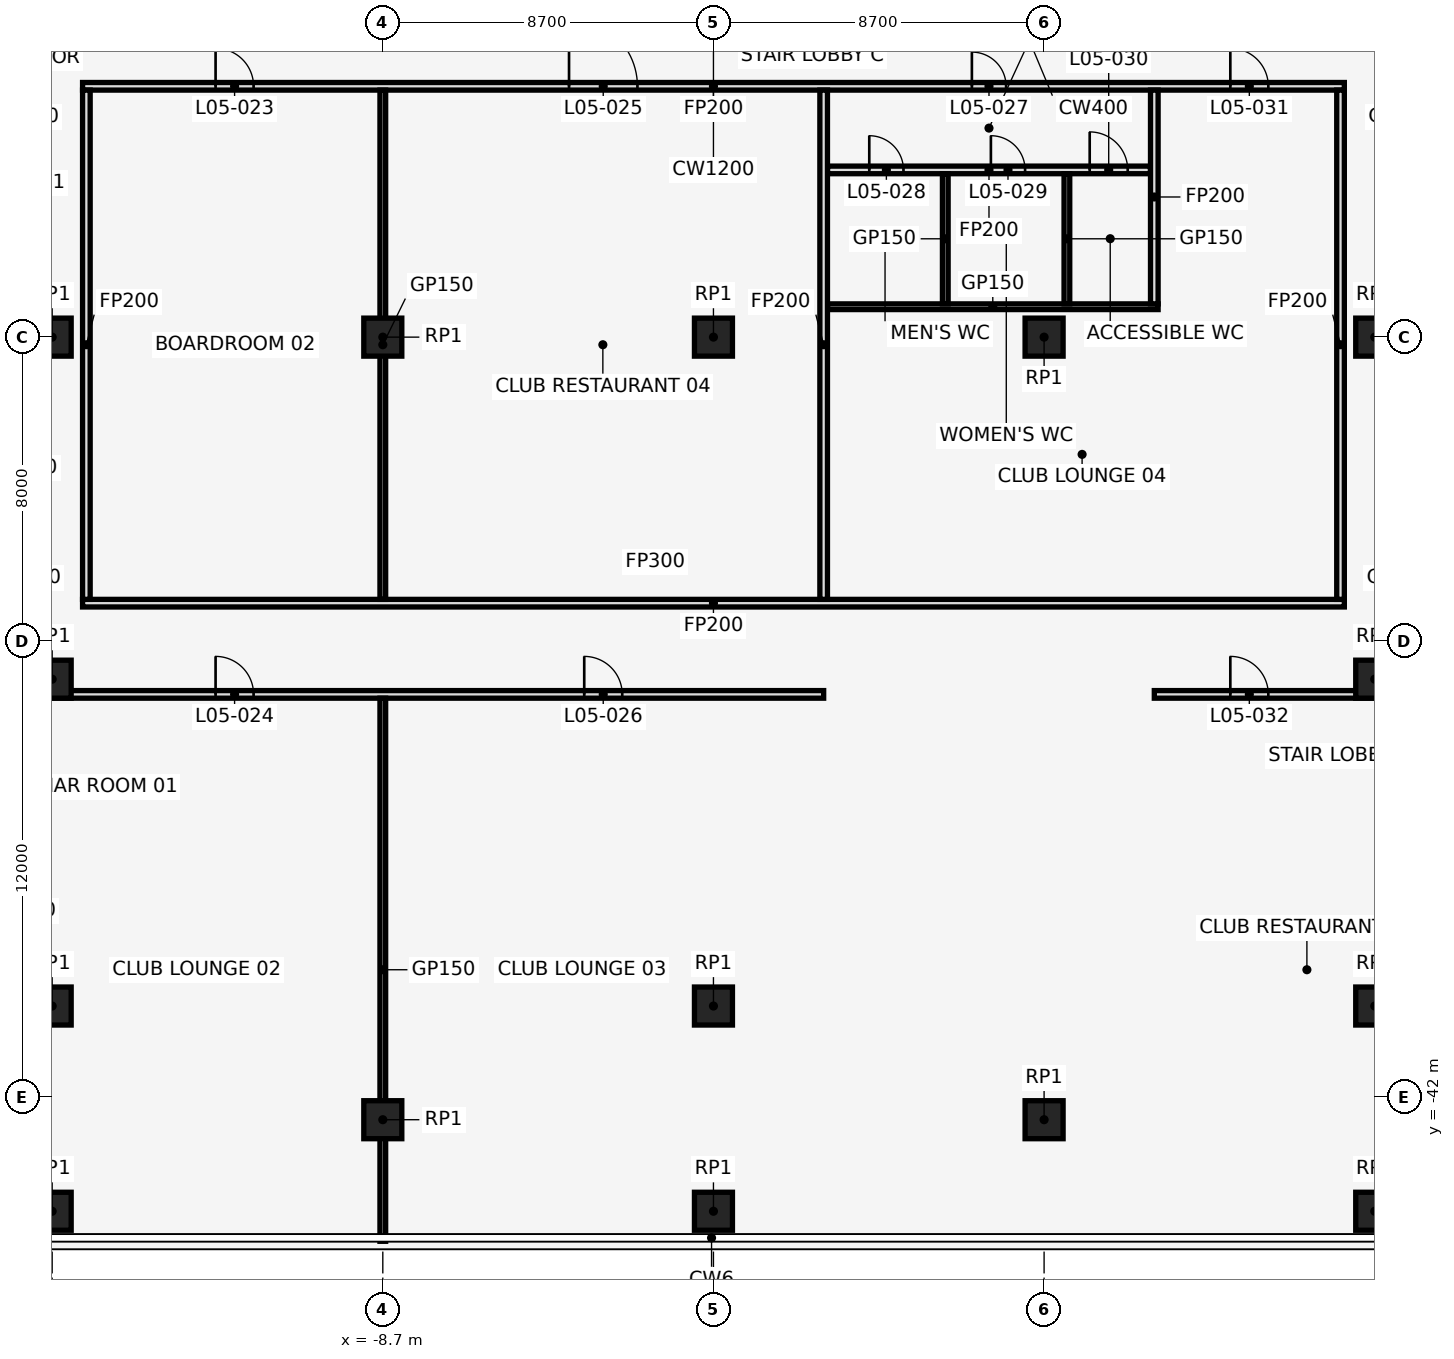
"""IFC4 building model, lengths in metres.
Left out: names, types, materials, properties, quantities, classifications, styles, units other than length and angle.
Written with IfcOpenShell. Run it as: python <this file> out.ifc"""

import sys

from ifc_helpers import new_model, si_unit, direction, frame, frame_2d, origin, origin_2d, place, context, subcontext, project, spatial, rectangle, extrude, element, fill, save


model = new_model("IFC4")
c1 = context("Model", 3, precision=1e-05, world=origin(), true_north=direction((0.0, 1.0)))
c2 = subcontext(c1, "Body", "Model", "MODEL_VIEW")
j1 = project(units=[si_unit("LENGTHUNIT", "METRE"), si_unit("PLANEANGLEUNIT", "RADIAN")], contexts=[c1])
p1 = place(None, origin())
s1 = spatial("IfcSite", under=j1, at=p1, CompositionType="ELEMENT")
p2 = place(p1, origin())
s2 = spatial("IfcBuilding", under=s1, at=p2, CompositionType="ELEMENT")
p3 = place(p2, frame((0.0, 0.0, 30.0)))
s3 = spatial("IfcBuildingStorey", under=s2, at=p3, CompositionType="ELEMENT", Elevation=30.0)
for number, where, z_axis, x_axis in (
    (1, (-17.4, -39.6, 0.0), (0.0, 0.0, 1.0), (1.0, 0.0, 0.0)),
    (2, (-8.7, -42.591, 0.0), (0.0, 0.0, 1.0), (1.0, 0.0, 0.0)),
    (3, (0.0, -39.6, 0.0), (0.0, 0.0, 1.0), (1.0, 0.0, 0.0)),
    (4, (8.7, -42.591, 0.0), (0.0, 0.0, 1.0), (1.0, 0.0, 0.0)),
    (5, (17.4, -39.6, 0.0), (0.0, 0.0, 1.0), (1.0, 0.0, 0.0)),
    (6, (-17.4, -22.0, 0.0), (0.0, 0.0, 1.0), (1.0, 0.0, 0.0)),
    (7, (-8.7, -22.0, 0.0), (0.0, 0.0, 1.0), (1.0, 0.0, 0.0)),
    (8, (0.0, -22.0, 0.0), (0.0, 0.0, 1.0), (1.0, 0.0, 0.0)),
    (9, (8.7, -22.0, 0.0), (0.0, 0.0, 1.0), (1.0, 0.0, 0.0)),
    (10, (17.4, -22.0, 0.0), (0.0, 0.0, 1.0), (1.0, 0.0, 0.0)),
    (11, (-17.4, -31.0, 0.0), (0.0, 0.0, 1.0), (1.0, 0.0, 0.0)),
    (12, (-17.4, -45.0, 0.0), (0.0, 0.0, 1.0), (1.0, 0.0, 0.0)),
    (13, (0.0, -45.0, 0.0), (0.0, 0.0, 1.0), (1.0, 0.0, 0.0)),
    (14, (17.4, -31.0, 0.0), (0.0, 0.0, 1.0), (1.0, 0.0, 0.0)),
    (15, (17.4, -45.0, 0.0), (0.0, 0.0, 1.0), (1.0, 0.0, 0.0)),
):
    element("IfcColumn", number, at=place(p3, frame(where, z_axis=z_axis, x_axis=x_axis)), inside=s3, PredefinedType="COLUMN", context=c2, shape_type="SweptSolid", body=[
        extrude(rectangle(XDim=1.0, YDim=1.0, at=origin_2d()), origin(), (0.0, 0.0, 1.0), 5.0),
    ])
p4 = place(p3, frame((-42.0, -31.4, 0.0), z_axis=(0.0, 0.0, 1.0), x_axis=(1.0, 0.0, 0.0)))
e16 = element("IfcWall", 16, at=p4, inside=s3, PredefinedType="PARTITIONING", context=c2, shape_type="SweptSolid", body=[
    extrude(rectangle(XDim=44.9, YDim=0.2, at=frame_2d((22.45, 0.0))), origin(), (0.0, 0.0, 1.0), 3.74),
])
p5 = place(p4, frame((1.5, 0.0, 0.0)))
e17 = element("IfcOpeningElement", 17, at=p5, cuts=e16, PredefinedType="OPENING", context=c2, shape_type="SweptSolid", body=[
    extrude(rectangle(XDim=1.0, YDim=2.1, at=frame_2d((0.5, 1.05))), frame((0.0, 0.112, 0.0), z_axis=(0.0, -1.0, 0.0), x_axis=(1.0, 0.0, 0.0)), (0.0, 0.0, 1.0), 0.224),
])
p6 = place(p4, frame((8.5, 0.0, 0.0)))
e18 = element("IfcOpeningElement", 18, at=p6, cuts=e16, PredefinedType="OPENING", context=c2, shape_type="SweptSolid", body=[
    extrude(rectangle(XDim=1.0, YDim=2.1, at=frame_2d((0.5, 1.05))), frame((0.0, 0.112, 0.0), z_axis=(0.0, -1.0, 0.0), x_axis=(1.0, 0.0, 0.0)), (0.0, 0.0, 1.0), 0.224),
])
p7 = place(p4, frame((17.2, 0.0, 0.0)))
e19 = element("IfcOpeningElement", 19, at=p7, cuts=e16, PredefinedType="OPENING", context=c2, shape_type="SweptSolid", body=[
    extrude(rectangle(XDim=1.0, YDim=2.1, at=frame_2d((0.5, 1.05))), frame((0.0, 0.112, 0.0), z_axis=(0.0, -1.0, 0.0), x_axis=(1.0, 0.0, 0.0)), (0.0, 0.0, 1.0), 0.224),
])
p8 = place(p4, frame((20.1, 0.0, 0.0)))
e20 = element("IfcOpeningElement", 20, at=p8, cuts=e16, PredefinedType="OPENING", context=c2, shape_type="SweptSolid", body=[
    extrude(rectangle(XDim=1.0, YDim=2.1, at=frame_2d((0.5, 1.05))), frame((0.0, 0.112, 0.0), z_axis=(0.0, -1.0, 0.0), x_axis=(1.0, 0.0, 0.0)), (0.0, 0.0, 1.0), 0.224),
])
p9 = place(p4, frame((28.9, 0.0, 0.0)))
e21 = element("IfcOpeningElement", 21, at=p9, cuts=e16, PredefinedType="OPENING", context=c2, shape_type="SweptSolid", body=[
    extrude(rectangle(XDim=1.0, YDim=2.1, at=frame_2d((0.5, 1.05))), frame((0.0, 0.112, 0.0), z_axis=(0.0, -1.0, 0.0), x_axis=(1.0, 0.0, 0.0)), (0.0, 0.0, 1.0), 0.224),
])
p10 = place(p4, frame((38.6, 0.0, 0.0)))
e22 = element("IfcOpeningElement", 22, at=p10, cuts=e16, PredefinedType="OPENING", context=c2, shape_type="SweptSolid", body=[
    extrude(rectangle(XDim=1.0, YDim=2.1, at=frame_2d((0.5, 1.05))), frame((0.0, 0.112, 0.0), z_axis=(0.0, -1.0, 0.0), x_axis=(1.0, 0.0, 0.0)), (0.0, 0.0, 1.0), 0.224),
])
p11 = place(p3, frame((11.6, -31.4, 0.0), z_axis=(0.0, 0.0, 1.0), x_axis=(1.0, 0.0, 0.0)))
e23 = element("IfcWall", 23, at=p11, inside=s3, PredefinedType="PARTITIONING", context=c2, shape_type="SweptSolid", body=[
    extrude(rectangle(XDim=30.4, YDim=0.2, at=frame_2d((15.2, 0.0))), origin(), (0.0, 0.0, 1.0), 3.74),
])
p12 = place(p11, frame((2.0, 0.0, 0.0)))
e24 = element("IfcOpeningElement", 24, at=p12, cuts=e23, PredefinedType="OPENING", context=c2, shape_type="SweptSolid", body=[
    extrude(rectangle(XDim=1.0, YDim=2.1, at=frame_2d((0.5, 1.05))), frame((0.0, 0.112, 0.0), z_axis=(0.0, -1.0, 0.0), x_axis=(1.0, 0.0, 0.0)), (0.0, 0.0, 1.0), 0.224),
])
p13 = place(p11, frame((9.3, 0.0, 0.0)))
e25 = element("IfcOpeningElement", 25, at=p13, cuts=e23, PredefinedType="OPENING", context=c2, shape_type="SweptSolid", body=[
    extrude(rectangle(XDim=1.0, YDim=2.1, at=frame_2d((0.5, 1.05))), frame((0.0, 0.112, 0.0), z_axis=(0.0, -1.0, 0.0), x_axis=(1.0, 0.0, 0.0)), (0.0, 0.0, 1.0), 0.224),
])
p14 = place(p11, frame((12.2, 0.0, 0.0)))
e26 = element("IfcOpeningElement", 26, at=p14, cuts=e23, PredefinedType="OPENING", context=c2, shape_type="SweptSolid", body=[
    extrude(rectangle(XDim=1.0, YDim=2.1, at=frame_2d((0.5, 1.05))), frame((0.0, 0.112, 0.0), z_axis=(0.0, -1.0, 0.0), x_axis=(1.0, 0.0, 0.0)), (0.0, 0.0, 1.0), 0.224),
])
p15 = place(p11, frame((18.3, 0.0, 0.0)))
e27 = element("IfcOpeningElement", 27, at=p15, cuts=e23, PredefinedType="OPENING", context=c2, shape_type="SweptSolid", body=[
    extrude(rectangle(XDim=1.0, YDim=2.1, at=frame_2d((0.5, 1.05))), frame((0.0, 0.112, 0.0), z_axis=(0.0, -1.0, 0.0), x_axis=(1.0, 0.0, 0.0)), (0.0, 0.0, 1.0), 0.224),
])
p16 = place(p11, frame((24.5, 0.0, 0.0)))
e28 = element("IfcOpeningElement", 28, at=p16, cuts=e23, PredefinedType="OPENING", context=c2, shape_type="SweptSolid", body=[
    extrude(rectangle(XDim=1.0, YDim=2.1, at=frame_2d((0.5, 1.05))), frame((0.0, 0.112, 0.0), z_axis=(0.0, -1.0, 0.0), x_axis=(1.0, 0.0, 0.0)), (0.0, 0.0, 1.0), 0.224),
])
p17 = place(p11, frame((27.9, 0.0, 0.0)))
e29 = element("IfcOpeningElement", 29, at=p17, cuts=e23, PredefinedType="OPENING", context=c2, shape_type="SweptSolid", body=[
    extrude(rectangle(XDim=1.0, YDim=2.1, at=frame_2d((0.5, 1.05))), frame((0.0, 0.112, 0.0), z_axis=(0.0, -1.0, 0.0), x_axis=(1.0, 0.0, 0.0)), (0.0, 0.0, 1.0), 0.224),
])
p18 = place(p3, frame((-16.6, -29.0, 0.0), z_axis=(0.0, 0.0, 1.0), x_axis=(1.0, 0.0, 0.0)))
e30 = element("IfcWall", 30, at=p18, inside=s3, PredefinedType="PARTITIONING", context=c2, shape_type="SweptSolid", body=[
    extrude(rectangle(XDim=33.2, YDim=0.2, at=frame_2d((16.6, 0.0))), origin(), (0.0, 0.0, 1.0), 3.74),
])
p19 = place(p3, frame((3.0, -21.2, 0.0), z_axis=(0.0, 0.0, 1.0), x_axis=(1.0, 0.0, 0.0)))
e31 = element("IfcWall", 31, at=p19, inside=s3, PredefinedType="PARTITIONING", context=c2, shape_type="SweptSolid", body=[
    extrude(rectangle(XDim=8.7, YDim=0.15, at=frame_2d((4.35, 0.0))), origin(), (0.0, 0.0, 1.0), 3.74),
])
p20 = place(p3, frame((3.0, -17.6, 0.0), z_axis=(0.0, 0.0, 1.0), x_axis=(1.0, 0.0, 0.0)))
e32 = element("IfcWall", 32, at=p20, inside=s3, PredefinedType="PARTITIONING", context=c2, shape_type="SweptSolid", body=[
    extrude(rectangle(XDim=8.5, YDim=0.2, at=frame_2d((4.25, 0.0))), origin(), (0.0, 0.0, 1.0), 3.74),
])
p21 = place(p20, frame((1.1, 0.0, 0.0)))
e33 = element("IfcOpeningElement", 33, at=p21, cuts=e32, PredefinedType="OPENING", context=c2, shape_type="SweptSolid", body=[
    extrude(rectangle(XDim=0.9, YDim=2.1, at=frame_2d((0.45, 1.05))), frame((0.0, 0.112, 0.0), z_axis=(0.0, -1.0, 0.0), x_axis=(1.0, 0.0, 0.0)), (0.0, 0.0, 1.0), 0.224),
])
p22 = place(p20, frame((4.3, 0.0, 0.0)))
e34 = element("IfcOpeningElement", 34, at=p22, cuts=e32, PredefinedType="OPENING", context=c2, shape_type="SweptSolid", body=[
    extrude(rectangle(XDim=0.9, YDim=2.1, at=frame_2d((0.45, 1.05))), frame((0.0, 0.112, 0.0), z_axis=(0.0, -1.0, 0.0), x_axis=(1.0, 0.0, 0.0)), (0.0, 0.0, 1.0), 0.224),
])
p23 = place(p20, frame((6.9, 0.0, 0.0)))
e35 = element("IfcOpeningElement", 35, at=p23, cuts=e32, PredefinedType="OPENING", context=c2, shape_type="SweptSolid", body=[
    extrude(rectangle(XDim=1.0, YDim=2.1, at=frame_2d((0.5, 1.05))), frame((0.0, 0.112, 0.0), z_axis=(0.0, -1.0, 0.0), x_axis=(1.0, 0.0, 0.0)), (0.0, 0.0, 1.0), 0.224),
])
p24 = place(p3, frame((-16.6, -15.4, 0.0), z_axis=(0.0, 0.0, 1.0), x_axis=(1.0, 0.0, 0.0)))
e36 = element("IfcWall", 36, at=p24, inside=s3, PredefinedType="PARTITIONING", context=c2, shape_type="SweptSolid", body=[
    extrude(rectangle(XDim=33.2, YDim=0.2, at=frame_2d((16.6, 0.0))), origin(), (0.0, 0.0, 1.0), 3.74),
])
p25 = place(p24, frame((3.5, 0.0, 0.0)))
e37 = element("IfcOpeningElement", 37, at=p25, cuts=e36, PredefinedType="OPENING", context=c2, shape_type="SweptSolid", body=[
    extrude(rectangle(XDim=1.0, YDim=2.1, at=frame_2d((0.5, 1.05))), frame((0.0, 0.112, 0.0), z_axis=(0.0, -1.0, 0.0), x_axis=(1.0, 0.0, 0.0)), (0.0, 0.0, 1.0), 0.224),
])
p26 = place(p24, frame((12.8, 0.0, 0.0)))
e38 = element("IfcOpeningElement", 38, at=p26, cuts=e36, PredefinedType="OPENING", context=c2, shape_type="SweptSolid", body=[
    extrude(rectangle(XDim=1.8, YDim=2.1, at=frame_2d((0.9, 1.05))), frame((0.0, 0.112, 0.0), z_axis=(0.0, -1.0, 0.0), x_axis=(1.0, 0.0, 0.0)), (0.0, 0.0, 1.0), 0.224),
])
p27 = place(p24, frame((23.4, 0.0, 0.0)))
e39 = element("IfcOpeningElement", 39, at=p27, cuts=e36, PredefinedType="OPENING", context=c2, shape_type="SweptSolid", body=[
    extrude(rectangle(XDim=0.9, YDim=2.1, at=frame_2d((0.45, 1.05))), frame((0.0, 0.112, 0.0), z_axis=(0.0, -1.0, 0.0), x_axis=(1.0, 0.0, 0.0)), (0.0, 0.0, 1.0), 0.224),
])
p28 = place(p24, frame((30.2, 0.0, 0.0)))
e40 = element("IfcOpeningElement", 40, at=p28, cuts=e36, PredefinedType="OPENING", context=c2, shape_type="SweptSolid", body=[
    extrude(rectangle(XDim=1.0, YDim=2.1, at=frame_2d((0.5, 1.05))), frame((0.0, 0.112, 0.0), z_axis=(0.0, -1.0, 0.0), x_axis=(1.0, 0.0, 0.0)), (0.0, 0.0, 1.0), 0.224),
])
p29 = place(p3, frame((-16.5, -28.9, 0.0), z_axis=(0.0, 0.0, 1.0), x_axis=(0.0, 1.0, 0.0)))
e41 = element("IfcWall", 41, at=p29, inside=s3, PredefinedType="PARTITIONING", context=c2, shape_type="SweptSolid", body=[
    extrude(rectangle(XDim=13.4, YDim=0.2, at=frame_2d((6.7, 0.0))), origin(), (0.0, 0.0, 1.0), 3.74),
])
p30 = place(p3, frame((-8.7, -45.79, 0.0), z_axis=(0.0, 0.0, 1.0), x_axis=(0.0, 1.0, 0.0)))
e42 = element("IfcWall", 42, at=p30, inside=s3, PredefinedType="PARTITIONING", context=c2, shape_type="SweptSolid", body=[
    extrude(rectangle(XDim=14.29, YDim=0.15, at=frame_2d((7.145, 0.0))), origin(), (0.0, 0.0, 1.0), 3.74),
])
p31 = place(p3, frame((-8.7, -28.9, 0.0), z_axis=(0.0, 0.0, 1.0), x_axis=(0.0, 1.0, 0.0)))
e43 = element("IfcWall", 43, at=p31, inside=s3, PredefinedType="PARTITIONING", context=c2, shape_type="SweptSolid", body=[
    extrude(rectangle(XDim=13.4, YDim=0.15, at=frame_2d((6.7, 0.0))), origin(), (0.0, 0.0, 1.0), 3.74),
])
p32 = place(p3, frame((2.9, -28.9, 0.0), z_axis=(0.0, 0.0, 1.0), x_axis=(0.0, 1.0, 0.0)))
e44 = element("IfcWall", 44, at=p32, inside=s3, PredefinedType="PARTITIONING", context=c2, shape_type="SweptSolid", body=[
    extrude(rectangle(XDim=13.4, YDim=0.2, at=frame_2d((6.7, 0.0))), origin(), (0.0, 0.0, 1.0), 3.74),
])
for number, where, z_axis, x_axis in (
    (45, (6.1, -21.125, 0.0), (0.0, 0.0, 1.0), (0.0, 1.0, 0.0)),
    (46, (9.3, -21.125, 0.0), (0.0, 0.0, 1.0), (0.0, 1.0, 0.0)),
):
    element("IfcWall", number, at=place(p3, frame(where, z_axis=z_axis, x_axis=x_axis)), inside=s3, PredefinedType="PARTITIONING", context=c2, shape_type="SweptSolid", body=[
        extrude(rectangle(XDim=3.425, YDim=0.15, at=frame_2d((1.712, 0.0))), origin(), (0.0, 0.0, 1.0), 3.74),
    ])
p33 = place(p3, frame((11.6, -21.125, 0.0), z_axis=(0.0, 0.0, 1.0), x_axis=(0.0, 1.0, 0.0)))
e47 = element("IfcWall", 47, at=p33, inside=s3, PredefinedType="PARTITIONING", context=c2, shape_type="SweptSolid", body=[
    extrude(rectangle(XDim=5.625, YDim=0.2, at=frame_2d((2.812, 0.0))), origin(), (0.0, 0.0, 1.0), 3.74),
])
p34 = place(p3, frame((16.5, -28.9, 0.0), z_axis=(0.0, 0.0, 1.0), x_axis=(0.0, 1.0, 0.0)))
e48 = element("IfcWall", 48, at=p34, inside=s3, PredefinedType="PARTITIONING", context=c2, shape_type="SweptSolid", body=[
    extrude(rectangle(XDim=13.4, YDim=0.2, at=frame_2d((6.7, 0.0))), origin(), (0.0, 0.0, 1.0), 3.74),
])
p35 = place(p25, frame((1.0, 0.0, 0.0), z_axis=(0.0, 0.0, 1.0), x_axis=(-1.0, 0.0, 0.0)))
e49 = element("IfcDoor", 49, at=p35, inside=s3, OperationType="SINGLE_SWING_RIGHT", PredefinedType="DOOR", context=c2, shape_type="SweptSolid", body=[
    extrude(rectangle(XDim=1.0, YDim=2.1, at=frame_2d((0.5, 1.05))), frame((0.0, 0.025, 0.0), z_axis=(0.0, -1.0, 0.0), x_axis=(1.0, 0.0, 0.0)), (0.0, 0.0, 1.0), 0.05),
])
fill(e37, e49)
p36 = place(p9, frame((1.0, 0.0, 0.0), z_axis=(0.0, 0.0, 1.0), x_axis=(-1.0, 0.0, 0.0)))
e50 = element("IfcDoor", 50, at=p36, inside=s3, OperationType="SINGLE_SWING_RIGHT", PredefinedType="DOOR", context=c2, shape_type="SweptSolid", body=[
    extrude(rectangle(XDim=1.0, YDim=2.1, at=frame_2d((0.5, 1.05))), frame((0.0, 0.025, 0.0), z_axis=(0.0, -1.0, 0.0), x_axis=(1.0, 0.0, 0.0)), (0.0, 0.0, 1.0), 0.05),
])
fill(e21, e50)
p37 = place(p26, origin())
e51 = element("IfcDoor", 51, at=p37, inside=s3, OperationType="SINGLE_SWING_LEFT", PredefinedType="DOOR", context=c2, shape_type="SweptSolid", body=[
    extrude(rectangle(XDim=1.8, YDim=2.1, at=frame_2d((0.9, 1.05))), frame((0.0, 0.025, 0.0), z_axis=(0.0, -1.0, 0.0), x_axis=(1.0, 0.0, 0.0)), (0.0, 0.0, 1.0), 0.05),
])
fill(e38, e51)
p38 = place(p10, frame((1.0, 0.0, 0.0), z_axis=(0.0, 0.0, 1.0), x_axis=(-1.0, 0.0, 0.0)))
e52 = element("IfcDoor", 52, at=p38, inside=s3, OperationType="SINGLE_SWING_RIGHT", PredefinedType="DOOR", context=c2, shape_type="SweptSolid", body=[
    extrude(rectangle(XDim=1.0, YDim=2.1, at=frame_2d((0.5, 1.05))), frame((0.0, 0.025, 0.0), z_axis=(0.0, -1.0, 0.0), x_axis=(1.0, 0.0, 0.0)), (0.0, 0.0, 1.0), 0.05),
])
fill(e22, e52)
p39 = place(p27, frame((0.9, 0.0, 0.0), z_axis=(0.0, 0.0, 1.0), x_axis=(-1.0, 0.0, 0.0)))
e53 = element("IfcDoor", 53, at=p39, inside=s3, OperationType="SINGLE_SWING_RIGHT", PredefinedType="DOOR", context=c2, shape_type="SweptSolid", body=[
    extrude(rectangle(XDim=0.9, YDim=2.1, at=frame_2d((0.45, 1.05))), frame((0.0, 0.025, 0.0), z_axis=(0.0, -1.0, 0.0), x_axis=(1.0, 0.0, 0.0)), (0.0, 0.0, 1.0), 0.05),
])
fill(e39, e53)
p40 = place(p21, frame((0.9, 0.0, 0.0), z_axis=(0.0, 0.0, 1.0), x_axis=(-1.0, 0.0, 0.0)))
e54 = element("IfcDoor", 54, at=p40, inside=s3, OperationType="SINGLE_SWING_LEFT", PredefinedType="DOOR", context=c2, shape_type="SweptSolid", body=[
    extrude(rectangle(XDim=0.9, YDim=2.1, at=frame_2d((0.45, 1.05))), frame((0.0, 0.025, 0.0), z_axis=(0.0, -1.0, 0.0), x_axis=(1.0, 0.0, 0.0)), (0.0, 0.0, 1.0), 0.05),
])
fill(e33, e54)
p41 = place(p22, frame((0.9, 0.0, 0.0), z_axis=(0.0, 0.0, 1.0), x_axis=(-1.0, 0.0, 0.0)))
e55 = element("IfcDoor", 55, at=p41, inside=s3, OperationType="SINGLE_SWING_RIGHT", PredefinedType="DOOR", context=c2, shape_type="SweptSolid", body=[
    extrude(rectangle(XDim=0.9, YDim=2.1, at=frame_2d((0.45, 1.05))), frame((0.0, 0.025, 0.0), z_axis=(0.0, -1.0, 0.0), x_axis=(1.0, 0.0, 0.0)), (0.0, 0.0, 1.0), 0.05),
])
fill(e34, e55)
p42 = place(p23, frame((1.0, 0.0, 0.0), z_axis=(0.0, 0.0, 1.0), x_axis=(-1.0, 0.0, 0.0)))
e56 = element("IfcDoor", 56, at=p42, inside=s3, OperationType="SINGLE_SWING_RIGHT", PredefinedType="DOOR", context=c2, shape_type="SweptSolid", body=[
    extrude(rectangle(XDim=1.0, YDim=2.1, at=frame_2d((0.5, 1.05))), frame((0.0, 0.025, 0.0), z_axis=(0.0, -1.0, 0.0), x_axis=(1.0, 0.0, 0.0)), (0.0, 0.0, 1.0), 0.05),
])
fill(e35, e56)
p43 = place(p28, frame((1.0, 0.0, 0.0), z_axis=(0.0, 0.0, 1.0), x_axis=(-1.0, 0.0, 0.0)))
e57 = element("IfcDoor", 57, at=p43, inside=s3, OperationType="SINGLE_SWING_LEFT", PredefinedType="DOOR", context=c2, shape_type="SweptSolid", body=[
    extrude(rectangle(XDim=1.0, YDim=2.1, at=frame_2d((0.5, 1.05))), frame((0.0, 0.025, 0.0), z_axis=(0.0, -1.0, 0.0), x_axis=(1.0, 0.0, 0.0)), (0.0, 0.0, 1.0), 0.05),
])
fill(e40, e57)
p44 = place(p12, frame((1.0, 0.0, 0.0), z_axis=(0.0, 0.0, 1.0), x_axis=(-1.0, 0.0, 0.0)))
e58 = element("IfcDoor", 58, at=p44, inside=s3, OperationType="SINGLE_SWING_RIGHT", PredefinedType="DOOR", context=c2, shape_type="SweptSolid", body=[
    extrude(rectangle(XDim=1.0, YDim=2.1, at=frame_2d((0.5, 1.05))), frame((0.0, 0.025, 0.0), z_axis=(0.0, -1.0, 0.0), x_axis=(1.0, 0.0, 0.0)), (0.0, 0.0, 1.0), 0.05),
])
fill(e24, e58)
save(model, sys.argv[1])
